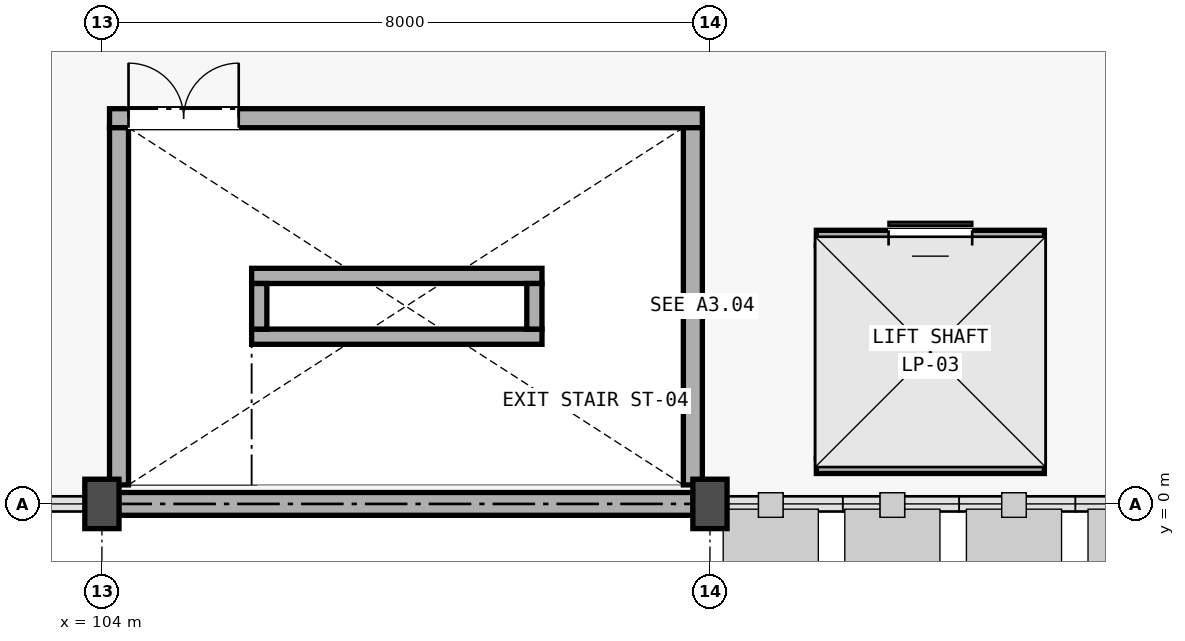
"""IFC4 building model, lengths in metres.
Left out: names, types, materials, properties, quantities, classifications, styles, units other than length and angle.
Written with IfcOpenShell. Run it as: python <this file> out.ifc"""

import sys

from ifc_helpers import new_model, si_unit, direction, frame, frame_2d, origin, origin_2d, place, context, subcontext, project, spatial, rectangle, extrude, element, fill, save


model = new_model("IFC4")
c1 = context("Model", 3, precision=1e-05, world=origin(), true_north=direction((0.0, 1.0)))
c2 = subcontext(c1, "Body", "Model", "MODEL_VIEW")
j1 = project(units=[si_unit("LENGTHUNIT", "METRE"), si_unit("PLANEANGLEUNIT", "RADIAN")], contexts=[c1])
p1 = place(None, origin())
s1 = spatial("IfcSite", under=j1, at=p1, CompositionType="ELEMENT")
p2 = place(p1, origin())
s2 = spatial("IfcBuilding", under=s1, at=p2, CompositionType="ELEMENT")
p3 = place(p2, frame((0.0, 0.0, 5.4)))
s3 = spatial("IfcBuildingStorey", under=s2, at=p3, CompositionType="ELEMENT", Elevation=5.4)
p4 = place(p3, frame((104.0, 0.0, 0.0), z_axis=(0.0, 0.0, 1.0), x_axis=(1.0, 0.0, 0.0)))
e1 = element("IfcColumn", 1, at=p4, inside=s3, PredefinedType="COLUMN", context=c2, shape_type="SweptSolid", body=[
    extrude(rectangle(XDim=0.45, YDim=0.65, at=origin_2d()), origin(), (0.0, 0.0, 1.0), 5.943),
])
p5 = place(p3, frame((112.0, 0.0, 0.0), z_axis=(0.0, 0.0, 1.0), x_axis=(1.0, 0.0, 0.0)))
e2 = element("IfcColumn", 2, at=p5, inside=s3, PredefinedType="COLUMN", context=c2, shape_type="SweptSolid", body=[
    extrude(rectangle(XDim=0.45, YDim=0.65, at=origin_2d()), origin(), (0.0, 0.0, 1.0), 6.743),
])
p6 = place(p3, frame((104.221, 0.0, 0.0), z_axis=(0.0, 0.0, 1.0), x_axis=(1.0, 0.0, 0.0)))
e3 = element("IfcWall", 3, at=p6, inside=s3, PredefinedType="SHEAR", context=c2, shape_type="SweptSolid", body=[
    extrude(rectangle(XDim=7.558, YDim=0.3, at=frame_2d((3.779, 0.0))), origin(), (0.0, 0.0, 1.0), 4.8),
])
p7 = place(p3, frame((104.1, 5.075, 0.0), z_axis=(0.0, 0.0, 1.0), x_axis=(1.0, 0.0, 0.0)))
e4 = element("IfcWall", 4, at=p7, inside=s3, PredefinedType="SHEAR", context=c2, shape_type="SweptSolid", body=[
    extrude(rectangle(XDim=7.8, YDim=0.25, at=frame_2d((3.9, 0.0))), origin(), (0.0, 0.0, 1.0), 4.55),
])
p8 = place(p7, frame((0.25, 0.0, 0.0)))
e5 = element("IfcOpeningElement", 5, at=p8, cuts=e4, PredefinedType="OPENING", context=c2, shape_type="SweptSolid", body=[
    extrude(rectangle(XDim=1.45, YDim=2.2, at=frame_2d((0.725, 1.1))), frame((0.0, 0.135, 0.0), z_axis=(0.0, -1.0, 0.0), x_axis=(1.0, 0.0, 0.0)), (0.0, 0.0, 1.0), 0.27),
])
for number, where, z_axis, x_axis in (
    (6, (104.225, 0.25, 0.0), (0.0, 0.0, 1.0), (0.0, 1.0, 0.0)),
    (7, (111.775, 0.25, 0.0), (0.0, 0.0, 1.0), (0.0, 1.0, 0.0)),
):
    element("IfcWall", number, at=place(p3, frame(where, z_axis=z_axis, x_axis=x_axis)), inside=s3, PredefinedType="SHEAR", context=c2, shape_type="SweptSolid", body=[
        extrude(rectangle(XDim=4.7, YDim=0.25, at=frame_2d((2.35, 0.0))), origin(), (0.0, 0.0, 1.0), 4.55),
    ])
for number, where, z_axis, x_axis in (
    (8, (105.97, 2.2, 0.0), (0.0, 0.0, 1.0), (1.0, 0.0, 0.0)),
    (9, (105.97, 3.0, 0.0), (0.0, 0.0, 1.0), (1.0, 0.0, 0.0)),
):
    element("IfcWall", number, at=place(p3, frame(where, z_axis=z_axis, x_axis=x_axis)), inside=s3, PredefinedType="SHEAR", context=c2, shape_type="SweptSolid", body=[
        extrude(rectangle(XDim=3.82, YDim=0.2, at=frame_2d((1.91, 0.0))), origin(), (0.0, 0.0, 1.0), 4.55),
    ])
for number, where, z_axis, x_axis in (
    (10, (106.07, 2.3, 0.0), (0.0, 0.0, 1.0), (0.0, 1.0, 0.0)),
    (11, (109.69, 2.3, 0.0), (0.0, 0.0, 1.0), (0.0, 1.0, 0.0)),
):
    element("IfcWall", number, at=place(p3, frame(where, z_axis=z_axis, x_axis=x_axis)), inside=s3, PredefinedType="SHEAR", context=c2, shape_type="SweptSolid", body=[
        extrude(rectangle(XDim=0.6, YDim=0.2, at=frame_2d((0.3, 0.0))), origin(), (0.0, 0.0, 1.0), 4.55),
    ])
p9 = place(p3, frame((113.4, 0.5, 0.0), z_axis=(0.0, 0.0, 1.0), x_axis=(1.0, 0.0, 0.0)))
e12 = element("IfcWall", 12, at=p9, inside=s3, PredefinedType="SHEAR", context=c2, shape_type="SweptSolid", body=[
    extrude(rectangle(XDim=3.0, YDim=0.2, at=frame_2d((1.5, 0.0))), origin(), (0.0, 0.0, 1.0), 4.55),
])
p10 = place(p3, frame((113.4, 3.5, 0.0), z_axis=(0.0, 0.0, 1.0), x_axis=(1.0, 0.0, 0.0)))
e13 = element("IfcWall", 13, at=p10, inside=s3, PredefinedType="SHEAR", context=c2, shape_type="SweptSolid", body=[
    extrude(rectangle(XDim=3.0, YDim=0.2, at=frame_2d((1.5, 0.0))), origin(), (0.0, 0.0, 1.0), 4.55),
])
p11 = place(p10, frame((0.95, 0.0, 0.0)))
e14 = element("IfcOpeningElement", 14, at=p11, cuts=e13, PredefinedType="OPENING", context=c2, shape_type="SweptSolid", body=[
    extrude(rectangle(XDim=1.1, YDim=2.2, at=frame_2d((0.55, 1.1))), frame((0.0, 0.11, 0.0), z_axis=(0.0, -1.0, 0.0), x_axis=(1.0, 0.0, 0.0)), (0.0, 0.0, 1.0), 0.22),
])
for number, where, z_axis, x_axis in (
    (15, (113.5, 0.6, 0.0), (0.0, 0.0, 1.0), (0.0, 1.0, 0.0)),
    (16, (116.3, 0.6, 0.0), (0.0, 0.0, 1.0), (0.0, 1.0, 0.0)),
):
    element("IfcWall", number, at=place(p3, frame(where, z_axis=z_axis, x_axis=x_axis)), inside=s3, PredefinedType="SHEAR", context=c2, shape_type="SweptSolid", body=[
        extrude(rectangle(XDim=2.8, YDim=0.2, at=frame_2d((1.4, 0.0))), origin(), (0.0, 0.0, 1.0), 4.55),
    ])
p12 = place(p8, origin())
e17 = element("IfcDoor", 17, at=p12, inside=s3, OperationType="DOUBLE_DOOR_SINGLE_SWING", PredefinedType="DOOR", context=c2, shape_type="SweptSolid", body=[
    extrude(rectangle(XDim=1.45, YDim=2.2, at=frame_2d((0.725, 1.1))), frame((0.0, 0.025, 0.0), z_axis=(0.0, -1.0, 0.0), x_axis=(1.0, 0.0, 0.0)), (0.0, 0.0, 1.0), 0.05),
])
fill(e5, e17)
p13 = place(p11, origin())
e18 = element("IfcDoor", 18, at=p13, inside=s3, OperationType="SLIDING_TO_LEFT", PredefinedType="DOOR", context=c2, shape_type="SweptSolid", body=[
    extrude(rectangle(XDim=1.1, YDim=2.2, at=frame_2d((0.55, 1.1))), frame((0.0, 0.025, 0.0), z_axis=(0.0, -1.0, 0.0), x_axis=(1.0, 0.0, 0.0)), (0.0, 0.0, 1.0), 0.05),
])
fill(e14, e18)
save(model, sys.argv[1])
